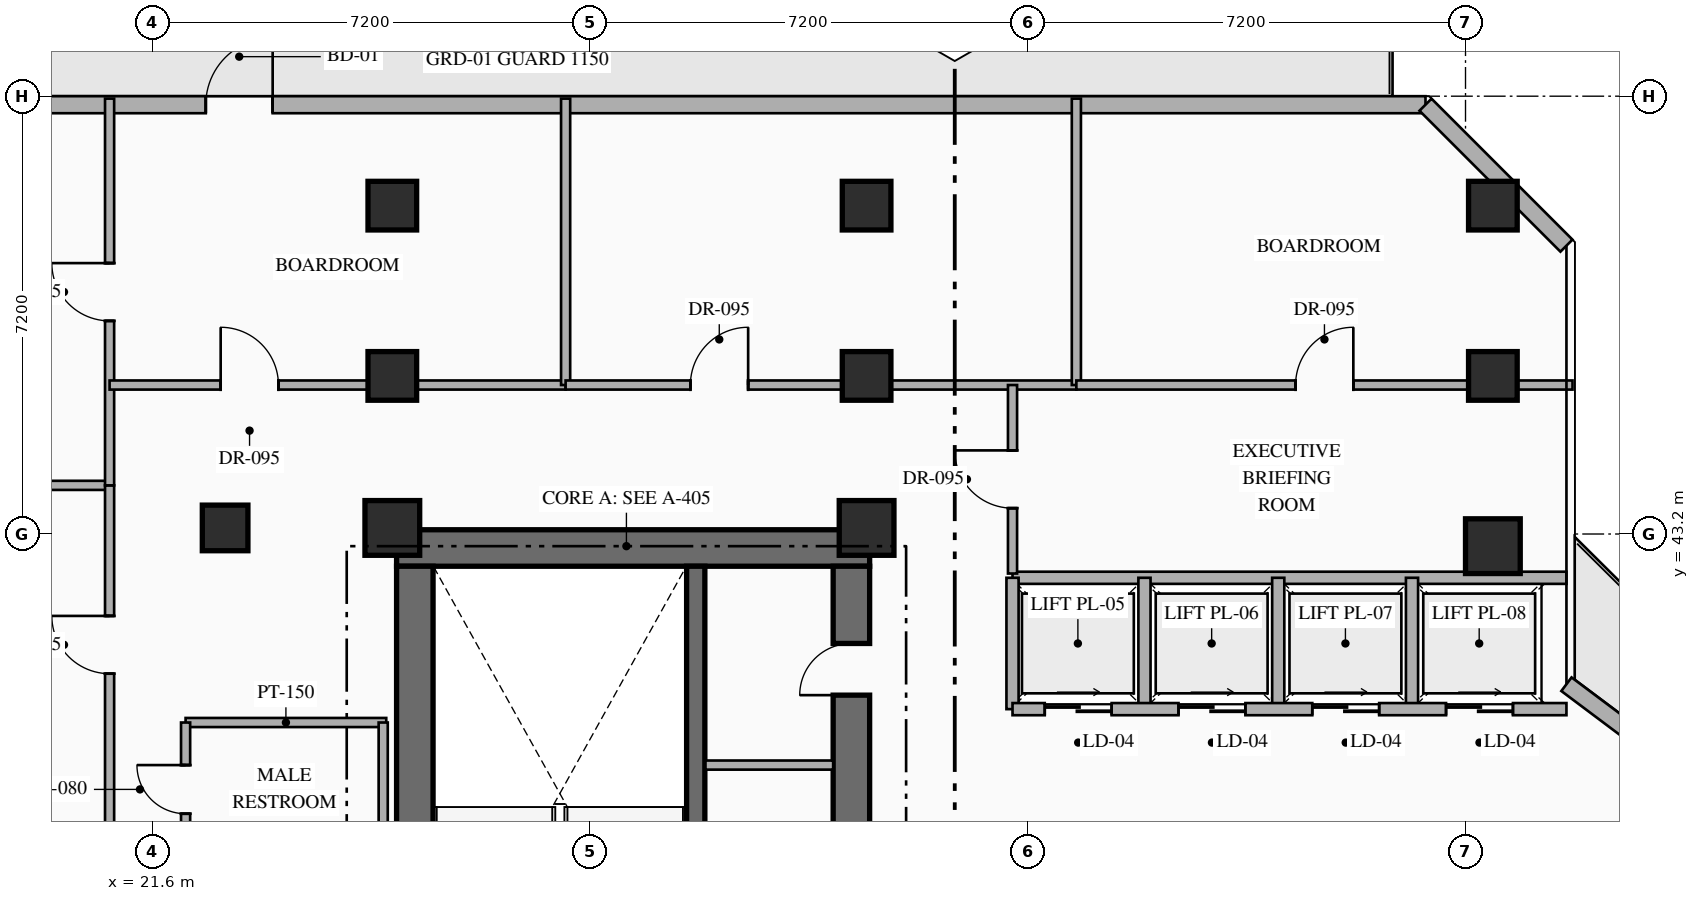
"""IFC4 building model, lengths in metres.
Left out: names, types, materials, properties, quantities, classifications, styles, units other than length and angle.
Written with IfcOpenShell. Run it as: python <this file> out.ifc"""

import sys

from ifc_helpers import new_model, si_unit, direction, frame, frame_2d, origin, origin_2d, place, context, subcontext, project, spatial, rectangle, hollow_rectangle, extrude, element, fill, save


model = new_model("IFC4")
c1 = context("Model", 3, precision=1e-05, world=origin(), true_north=direction((0.0, 1.0)))
c2 = subcontext(c1, "Body", "Model", "MODEL_VIEW")
j1 = project(units=[si_unit("LENGTHUNIT", "METRE"), si_unit("PLANEANGLEUNIT", "RADIAN")], contexts=[c1])
p1 = place(None, origin())
s1 = spatial("IfcSite", under=j1, at=p1, CompositionType="ELEMENT")
p2 = place(p1, origin())
s2 = spatial("IfcBuilding", under=s1, at=p2, CompositionType="ELEMENT")
p3 = place(p2, frame((0.0, 0.0, 178.05)))
s3 = spatial("IfcBuildingStorey", under=s2, at=p3, CompositionType="ELEMENT", Elevation=178.05)
p4 = place(p3, frame((25.62, 42.97, 0.0), z_axis=(0.0, 0.0, 1.0), x_axis=(1.0, 0.0, 0.0)))
e1 = element("IfcWall", 1, at=p4, inside=s3, PredefinedType="SHEAR", context=c2, shape_type="SweptSolid", body=[
    extrude(rectangle(XDim=7.78, YDim=0.6, at=frame_2d((3.89, 0.0))), origin(), (0.0, 0.0, 1.0), 3.6),
])
p5 = place(p3, frame((25.92, 33.19, 0.0), z_axis=(0.0, 0.0, 1.0), x_axis=(0.0, 1.0, 0.0)))
e2 = element("IfcWall", 2, at=p5, inside=s3, PredefinedType="SHEAR", context=c2, shape_type="SweptSolid", body=[
    extrude(rectangle(XDim=9.48, YDim=0.6, at=frame_2d((4.74, 0.0))), origin(), (0.0, 0.0, 1.0), 3.6),
])
p6 = place(p3, frame((33.1, 33.19, 0.0), z_axis=(0.0, 0.0, 1.0), x_axis=(0.0, 1.0, 0.0)))
e3 = element("IfcWall", 3, at=p6, inside=s3, PredefinedType="SHEAR", context=c2, shape_type="SweptSolid", body=[
    extrude(rectangle(XDim=9.48, YDim=0.6, at=frame_2d((4.74, 0.0))), origin(), (0.0, 0.0, 1.0), 3.6),
])
p7 = place(p6, frame((4.16, 0.0, 0.0)))
e4 = element("IfcOpeningElement", 4, at=p7, cuts=e3, PredefinedType="OPENING", context=c2, shape_type="SweptSolid", body=[
    extrude(rectangle(XDim=0.85, YDim=2.08, at=frame_2d((0.425, 1.04))), frame((0.0, 0.31, 0.0), z_axis=(0.0, -1.0, 0.0), x_axis=(1.0, 0.0, 0.0)), (0.0, 0.0, 1.0), 0.62),
])
p8 = place(p6, frame((7.36, 0.0, 0.0)))
e5 = element("IfcOpeningElement", 5, at=p8, cuts=e3, PredefinedType="OPENING", context=c2, shape_type="SweptSolid", body=[
    extrude(rectangle(XDim=0.85, YDim=2.08, at=frame_2d((0.425, 1.04))), frame((0.0, 0.31, 0.0), z_axis=(0.0, -1.0, 0.0), x_axis=(1.0, 0.0, 0.0)), (0.0, 0.0, 1.0), 0.62),
])
p9 = place(p3, frame((30.54, 33.19, 0.0), z_axis=(0.0, 0.0, 1.0), x_axis=(0.0, 1.0, 0.0)))
e6 = element("IfcWall", 6, at=p9, inside=s3, PredefinedType="SHEAR", context=c2, shape_type="SweptSolid", body=[
    extrude(rectangle(XDim=9.48, YDim=0.3, at=frame_2d((4.74, 0.0))), origin(), (0.0, 0.0, 1.0), 3.6),
])
for number, where, z_axis, x_axis in (
    (7, (25.55, 43.3, 0.0), (0.0, 0.0, 1.0), (1.0, 0.0, 0.0)),
    (8, (33.35, 43.3, 0.0), (0.0, 0.0, 1.0), (1.0, 0.0, 0.0)),
    (9, (43.65, 43.0, 0.0), (0.0, 0.0, 1.0), (1.0, 0.0, 0.0)),
):
    element("IfcColumn", number, at=place(p3, frame(where, z_axis=z_axis, x_axis=x_axis)), inside=s3, PredefinedType="COLUMN", context=c2, shape_type="SweptSolid", body=[
        extrude(rectangle(XDim=0.9, YDim=0.9, at=origin_2d()), origin(), (0.0, 0.0, 1.0), 3.6),
    ])
for number, where, z_axis, x_axis in (
    (10, (25.55, 45.8, 0.0), (0.0, 0.0, 1.0), (1.0, 0.0, 0.0)),
    (11, (33.35, 45.8, 0.0), (0.0, 0.0, 1.0), (1.0, 0.0, 0.0)),
    (12, (43.65, 45.8, 0.0), (0.0, 0.0, 1.0), (1.0, 0.0, 0.0)),
    (13, (25.55, 48.6, 0.0), (0.0, 0.0, 1.0), (1.0, 0.0, 0.0)),
    (14, (33.35, 48.6, 0.0), (0.0, 0.0, 1.0), (1.0, 0.0, 0.0)),
    (15, (43.65, 48.6, 0.0), (0.0, 0.0, 1.0), (1.0, 0.0, 0.0)),
):
    element("IfcColumn", number, at=place(p3, frame(where, z_axis=z_axis, x_axis=x_axis)), inside=s3, PredefinedType="COLUMN", context=c2, shape_type="SweptSolid", body=[
        extrude(hollow_rectangle(XDim=0.8, YDim=0.8, WallThickness=0.032, at=origin_2d()), origin(), (0.0, 0.0, 1.0), 3.6),
    ])
p10 = place(p3, frame((22.8, 43.3, 0.0), z_axis=(0.0, 0.0, 1.0), x_axis=(1.0, 0.0, 0.0)))
e16 = element("IfcColumn", 16, at=p10, inside=s3, PredefinedType="COLUMN", context=c2, shape_type="SweptSolid", body=[
    extrude(hollow_rectangle(XDim=0.75, YDim=0.75, WallThickness=0.028, at=origin_2d()), origin(), (0.0, 0.0, 1.0), 3.6),
])
p11 = place(p3, frame((44.86, 40.73, 0.0), z_axis=(0.0, 0.0, 1.0), x_axis=(0.800007624502, -0.599989833863, 0.0)))
e17 = element("IfcWall", 17, at=p11, inside=s3, PredefinedType="STANDARD", context=c2, shape_type="SweptSolid", body=[
    extrude(rectangle(XDim=19.212, YDim=0.28, at=frame_2d((9.606, 0.0))), origin(), (0.0, 0.0, 1.0), 3.3),
])
p12 = place(p11, frame((1.755, 0.0, 0.0)))
e18 = element("IfcOpeningElement", 18, at=p12, cuts=e17, PredefinedType="OPENING", context=c2, shape_type="SweptSolid", body=[
    extrude(rectangle(XDim=1.1, YDim=2.2, at=frame_2d((0.55, 1.1))), frame((0.0, 0.15, 0.0), z_axis=(0.0, -1.0, 0.0), x_axis=(1.0, 0.0, 0.0)), (0.0, 0.0, 1.0), 0.3),
])
p13 = place(p11, frame((13.509, 0.0, 0.85)))
e19 = element("IfcOpeningElement", 19, at=p13, cuts=e17, PredefinedType="OPENING", context=c2, shape_type="SweptSolid", body=[
    extrude(rectangle(XDim=1.8, YDim=2.1, at=frame_2d((0.9, 1.05))), frame((0.0, 0.15, 0.0), z_axis=(0.0, -1.0, 0.0), x_axis=(1.0, 0.0, 0.0)), (0.0, 0.0, 1.0), 0.3),
])
p14 = place(p3, frame((12.058, 50.26, 0.0), z_axis=(0.0, 0.0, 1.0), x_axis=(1.0, 0.0, 0.0)))
e20 = element("IfcWall", 20, at=p14, inside=s3, PredefinedType="STANDARD", context=c2, shape_type="SweptSolid", body=[
    extrude(rectangle(XDim=30.484, YDim=0.28, at=frame_2d((15.242, 0.0))), origin(), (0.0, 0.0, 1.0), 3.3),
])
p15 = place(p14, frame((10.424, 0.0, 0.0)))
e21 = element("IfcOpeningElement", 21, at=p15, cuts=e20, PredefinedType="OPENING", context=c2, shape_type="SweptSolid", body=[
    extrude(rectangle(XDim=1.1, YDim=2.2, at=frame_2d((0.55, 1.1))), frame((0.0, 0.15, 0.0), z_axis=(0.0, -1.0, 0.0), x_axis=(1.0, 0.0, 0.0)), (0.0, 0.0, 1.0), 0.3),
])
p16 = place(p3, frame((42.542, 50.26, 0.0), z_axis=(0.0, 0.0, 1.0), x_axis=(0.707106781187, -0.707106781187, 0.0)))
e22 = element("IfcWall", 22, at=p16, inside=s3, PredefinedType="STANDARD", context=c2, shape_type="SweptSolid", body=[
    extrude(rectangle(XDim=3.278, YDim=0.28, at=frame_2d((1.639, 0.0))), origin(), (0.0, 0.0, 1.0), 3.3),
])
p17 = place(p3, frame((30.7, 39.4, 0.0), z_axis=(0.0, 0.0, 1.0), x_axis=(1.0, 0.0, 0.0)))
e23 = element("IfcWall", 23, at=p17, inside=s3, PredefinedType="PARTITIONING", context=c2, shape_type="SweptSolid", body=[
    extrude(rectangle(XDim=2.1, YDim=0.15, at=frame_2d((1.05, 0.0))), origin(), (0.0, 0.0, 1.0), 3.3),
])
p18 = place(p3, frame((35.75, 42.48, 0.0), z_axis=(0.0, 0.0, 1.0), x_axis=(1.0, 0.0, 0.0)))
e24 = element("IfcWall", 24, at=p18, inside=s3, PredefinedType="STANDARD", context=c2, shape_type="SweptSolid", body=[
    extrude(rectangle(XDim=9.11, YDim=0.2, at=frame_2d((4.555, 0.0))), origin(), (0.0, 0.0, 1.0), 3.3),
])
for number, where, z_axis, x_axis in (
    (25, (35.75, 40.32, 0.0), (0.0, 0.0, 1.0), (0.0, 1.0, 0.0)),
    (26, (37.92, 40.32, 0.0), (0.0, 0.0, 1.0), (0.0, 1.0, 0.0)),
    (27, (40.12, 40.32, 0.0), (0.0, 0.0, 1.0), (0.0, 1.0, 0.0)),
    (28, (42.32, 40.32, 0.0), (0.0, 0.0, 1.0), (0.0, 1.0, 0.0)),
):
    element("IfcWall", number, at=place(p3, frame(where, z_axis=z_axis, x_axis=x_axis)), inside=s3, PredefinedType="STANDARD", context=c2, shape_type="SweptSolid", body=[
        extrude(rectangle(XDim=2.16, YDim=0.2, at=frame_2d((1.08, 0.0))), origin(), (0.0, 0.0, 1.0), 3.3),
    ])
p19 = place(p3, frame((35.75, 40.32, 0.0), z_axis=(0.0, 0.0, 1.0), x_axis=(1.0, 0.0, 0.0)))
e29 = element("IfcWall", 29, at=p19, inside=s3, PredefinedType="STANDARD", context=c2, shape_type="SweptSolid", body=[
    extrude(rectangle(XDim=9.11, YDim=0.2, at=frame_2d((4.555, 0.0))), origin(), (0.0, 0.0, 1.0), 3.3),
])
p20 = place(p19, frame((0.53, 0.0, 0.0)))
e30 = element("IfcOpeningElement", 30, at=p20, cuts=e29, PredefinedType="OPENING", context=c2, shape_type="SweptSolid", body=[
    extrude(rectangle(XDim=1.1, YDim=2.18, at=frame_2d((0.55, 1.09))), frame((0.0, 0.11, 0.0), z_axis=(0.0, -1.0, 0.0), x_axis=(1.0, 0.0, 0.0)), (0.0, 0.0, 1.0), 0.22),
])
p21 = place(p19, frame((2.73, 0.0, 0.0)))
e31 = element("IfcOpeningElement", 31, at=p21, cuts=e29, PredefinedType="OPENING", context=c2, shape_type="SweptSolid", body=[
    extrude(rectangle(XDim=1.1, YDim=2.18, at=frame_2d((0.55, 1.09))), frame((0.0, 0.11, 0.0), z_axis=(0.0, -1.0, 0.0), x_axis=(1.0, 0.0, 0.0)), (0.0, 0.0, 1.0), 0.22),
])
p22 = place(p19, frame((4.93, 0.0, 0.0)))
e32 = element("IfcOpeningElement", 32, at=p22, cuts=e29, PredefinedType="OPENING", context=c2, shape_type="SweptSolid", body=[
    extrude(rectangle(XDim=1.1, YDim=2.18, at=frame_2d((0.55, 1.09))), frame((0.0, 0.11, 0.0), z_axis=(0.0, -1.0, 0.0), x_axis=(1.0, 0.0, 0.0)), (0.0, 0.0, 1.0), 0.22),
])
p23 = place(p19, frame((7.13, 0.0, 0.0)))
e33 = element("IfcOpeningElement", 33, at=p23, cuts=e29, PredefinedType="OPENING", context=c2, shape_type="SweptSolid", body=[
    extrude(rectangle(XDim=1.1, YDim=2.18, at=frame_2d((0.55, 1.09))), frame((0.0, 0.11, 0.0), z_axis=(0.0, -1.0, 0.0), x_axis=(1.0, 0.0, 0.0)), (0.0, 0.0, 1.0), 0.22),
])
p24 = place(p3, frame((22.15, 40.1, 0.0), z_axis=(0.0, 0.0, 1.0), x_axis=(1.0, 0.0, 0.0)))
e34 = element("IfcWall", 34, at=p24, inside=s3, PredefinedType="PARTITIONING", context=c2, shape_type="SweptSolid", body=[
    extrude(rectangle(XDim=3.3, YDim=0.15, at=frame_2d((1.65, 0.0))), origin(), (0.0, 0.0, 1.0), 3.3),
])
p25 = place(p3, frame((25.4, 33.5, 0.0), z_axis=(0.0, 0.0, 1.0), x_axis=(0.0, 1.0, 0.0)))
e35 = element("IfcWall", 35, at=p25, inside=s3, PredefinedType="PARTITIONING", context=c2, shape_type="SweptSolid", body=[
    extrude(rectangle(XDim=6.6, YDim=0.15, at=frame_2d((3.3, 0.0))), origin(), (0.0, 0.0, 1.0), 3.3),
])
p26 = place(p3, frame((22.15, 37.9, 0.0), z_axis=(0.0, 0.0, 1.0), x_axis=(0.0, 1.0, 0.0)))
e36 = element("IfcWall", 36, at=p26, inside=s3, PredefinedType="PARTITIONING", context=c2, shape_type="SweptSolid", body=[
    extrude(rectangle(XDim=2.2, YDim=0.15, at=frame_2d((1.1, 0.0))), origin(), (0.0, 0.0, 1.0), 3.3),
])
p27 = place(p26, frame((0.7, 0.0, 0.0)))
e37 = element("IfcOpeningElement", 37, at=p27, cuts=e36, PredefinedType="OPENING", context=c2, shape_type="SweptSolid", body=[
    extrude(rectangle(XDim=0.8, YDim=2.06, at=frame_2d((0.4, 1.03))), frame((0.0, 0.085, 0.0), z_axis=(0.0, -1.0, 0.0), x_axis=(1.0, 0.0, 0.0)), (0.0, 0.0, 1.0), 0.17),
])
p28 = place(p3, frame((9.64, 44.0, 0.0), z_axis=(0.0, 0.0, 1.0), x_axis=(1.0, 0.0, 0.0)))
e38 = element("IfcWall", 38, at=p28, inside=s3, PredefinedType="PARTITIONING", context=c2, shape_type="SweptSolid", body=[
    extrude(rectangle(XDim=11.26, YDim=0.15, at=frame_2d((5.63, 0.0))), origin(), (0.0, 0.0, 1.0), 3.3),
])
p29 = place(p3, frame((20.9, 36.4, 0.0), z_axis=(0.0, 0.0, 1.0), x_axis=(0.0, 1.0, 0.0)))
e39 = element("IfcWall", 39, at=p29, inside=s3, PredefinedType="PARTITIONING", context=c2, shape_type="SweptSolid", body=[
    extrude(rectangle(XDim=7.6, YDim=0.15, at=frame_2d((3.8, 0.0))), origin(), (0.0, 0.0, 1.0), 3.3),
])
p30 = place(p29, frame((4.503, 0.0, 0.0)))
e40 = element("IfcOpeningElement", 40, at=p30, cuts=e39, PredefinedType="OPENING", context=c2, shape_type="SweptSolid", body=[
    extrude(rectangle(XDim=0.95, YDim=2.15, at=frame_2d((0.475, 1.075))), frame((0.0, 0.085, 0.0), z_axis=(0.0, -1.0, 0.0), x_axis=(1.0, 0.0, 0.0)), (0.0, 0.0, 1.0), 0.17),
])
p31 = place(p3, frame((20.9, 44.0, 0.0), z_axis=(0.0, 0.0, 1.0), x_axis=(0.0, 1.0, 0.0)))
e41 = element("IfcWall", 41, at=p31, inside=s3, PredefinedType="PARTITIONING", context=c2, shape_type="SweptSolid", body=[
    extrude(rectangle(XDim=6.36, YDim=0.15, at=frame_2d((3.18, 0.0))), origin(), (0.0, 0.0, 1.0), 3.3),
])
p32 = place(p31, frame((2.705, 0.0, 0.0)))
e42 = element("IfcOpeningElement", 42, at=p32, cuts=e41, PredefinedType="OPENING", context=c2, shape_type="SweptSolid", body=[
    extrude(rectangle(XDim=0.95, YDim=2.15, at=frame_2d((0.475, 1.075))), frame((0.0, 0.085, 0.0), z_axis=(0.0, -1.0, 0.0), x_axis=(1.0, 0.0, 0.0)), (0.0, 0.0, 1.0), 0.17),
])
p33 = place(p3, frame((20.9, 45.65, 0.0), z_axis=(0.0, 0.0, 1.0), x_axis=(1.0, 0.0, 0.0)))
e43 = element("IfcWall", 43, at=p33, inside=s3, PredefinedType="PARTITIONING", context=c2, shape_type="SweptSolid", body=[
    extrude(rectangle(XDim=7.5, YDim=0.15, at=frame_2d((3.75, 0.0))), origin(), (0.0, 0.0, 1.0), 2.645),
])
p34 = place(p33, frame((1.827, 0.0, 0.0)))
e44 = element("IfcOpeningElement", 44, at=p34, cuts=e43, PredefinedType="OPENING", context=c2, shape_type="SweptSolid", body=[
    extrude(rectangle(XDim=0.95, YDim=2.15, at=frame_2d((0.475, 1.075))), frame((0.0, 0.085, 0.0), z_axis=(0.0, -1.0, 0.0), x_axis=(1.0, 0.0, 0.0)), (0.0, 0.0, 1.0), 0.17),
])
p35 = place(p3, frame((28.4, 45.65, 0.0), z_axis=(0.0, 0.0, 1.0), x_axis=(0.0, 1.0, 0.0)))
e45 = element("IfcWall", 45, at=p35, inside=s3, PredefinedType="PARTITIONING", context=c2, shape_type="SweptSolid", body=[
    extrude(rectangle(XDim=4.71, YDim=0.15, at=frame_2d((2.355, 0.0))), origin(), (0.0, 0.0, 1.0), 3.3),
])
p36 = place(p3, frame((28.4, 45.65, 0.0), z_axis=(0.0, 0.0, 1.0), x_axis=(1.0, 0.0, 0.0)))
e46 = element("IfcWall", 46, at=p36, inside=s3, PredefinedType="PARTITIONING", context=c2, shape_type="SweptSolid", body=[
    extrude(rectangle(XDim=8.4, YDim=0.15, at=frame_2d((4.2, 0.0))), origin(), (0.0, 0.0, 1.0), 2.645),
])
p37 = place(p36, frame((2.052, 0.0, 0.0)))
e47 = element("IfcOpeningElement", 47, at=p37, cuts=e46, PredefinedType="OPENING", context=c2, shape_type="SweptSolid", body=[
    extrude(rectangle(XDim=0.95, YDim=2.15, at=frame_2d((0.475, 1.075))), frame((0.0, 0.085, 0.0), z_axis=(0.0, -1.0, 0.0), x_axis=(1.0, 0.0, 0.0)), (0.0, 0.0, 1.0), 0.17),
])
p38 = place(p3, frame((36.8, 45.65, 0.0), z_axis=(0.0, 0.0, 1.0), x_axis=(0.0, 1.0, 0.0)))
e48 = element("IfcWall", 48, at=p38, inside=s3, PredefinedType="PARTITIONING", context=c2, shape_type="SweptSolid", body=[
    extrude(rectangle(XDim=4.71, YDim=0.15, at=frame_2d((2.355, 0.0))), origin(), (0.0, 0.0, 1.0), 3.3),
])
p39 = place(p3, frame((36.8, 45.65, 0.0), z_axis=(0.0, 0.0, 1.0), x_axis=(1.0, 0.0, 0.0)))
e49 = element("IfcWall", 49, at=p39, inside=s3, PredefinedType="PARTITIONING", context=c2, shape_type="SweptSolid", body=[
    extrude(rectangle(XDim=8.16, YDim=0.15, at=frame_2d((4.08, 0.0))), origin(), (0.0, 0.0, 1.0), 2.645),
])
p40 = place(p39, frame((3.605, 0.0, 0.0)))
e50 = element("IfcOpeningElement", 50, at=p40, cuts=e49, PredefinedType="OPENING", context=c2, shape_type="SweptSolid", body=[
    extrude(rectangle(XDim=0.95, YDim=2.15, at=frame_2d((0.475, 1.075))), frame((0.0, 0.085, 0.0), z_axis=(0.0, -1.0, 0.0), x_axis=(1.0, 0.0, 0.0)), (0.0, 0.0, 1.0), 0.17),
])
p41 = place(p3, frame((35.75, 42.55, 0.0), z_axis=(0.0, 0.0, 1.0), x_axis=(0.0, 1.0, 0.0)))
e51 = element("IfcWall", 51, at=p41, inside=s3, PredefinedType="PARTITIONING", context=c2, shape_type="SweptSolid", body=[
    extrude(rectangle(XDim=3.1, YDim=0.15, at=frame_2d((1.55, 0.0))), origin(), (0.0, 0.0, 1.0), 3.3),
])
p42 = place(p41, frame((1.075, 0.0, 0.0)))
e52 = element("IfcOpeningElement", 52, at=p42, cuts=e51, PredefinedType="OPENING", context=c2, shape_type="SweptSolid", body=[
    extrude(rectangle(XDim=0.95, YDim=2.15, at=frame_2d((0.475, 1.075))), frame((0.0, 0.085, 0.0), z_axis=(0.0, -1.0, 0.0), x_axis=(1.0, 0.0, 0.0)), (0.0, 0.0, 1.0), 0.17),
])
p43 = place(p15, origin())
e53 = element("IfcDoor", 53, at=p43, inside=s3, OperationType="SINGLE_SWING_RIGHT", PredefinedType="DOOR", context=c2, shape_type="SweptSolid", body=[
    extrude(rectangle(XDim=1.1, YDim=2.2, at=frame_2d((0.55, 1.1))), frame((0.0, 0.025, 0.0), z_axis=(0.0, -1.0, 0.0), x_axis=(1.0, 0.0, 0.0)), (0.0, 0.0, 1.0), 0.05),
])
fill(e21, e53)
p44 = place(p8, origin())
e54 = element("IfcDoor", 54, at=p44, inside=s3, OperationType="SINGLE_SWING_LEFT", PredefinedType="DOOR", context=c2, shape_type="SweptSolid", body=[
    extrude(rectangle(XDim=0.85, YDim=2.08, at=frame_2d((0.425, 1.04))), frame((0.0, 0.025, 0.0), z_axis=(0.0, -1.0, 0.0), x_axis=(1.0, 0.0, 0.0)), (0.0, 0.0, 1.0), 0.05),
])
fill(e5, e54)
p45 = place(p20, origin())
e55 = element("IfcDoor", 55, at=p45, inside=s3, OperationType="SLIDING_TO_RIGHT", PredefinedType="USERDEFINED", context=c2, shape_type="SweptSolid", body=[
    extrude(rectangle(XDim=1.1, YDim=2.18, at=frame_2d((0.55, 1.09))), frame((0.0, 0.025, 0.0), z_axis=(0.0, -1.0, 0.0), x_axis=(1.0, 0.0, 0.0)), (0.0, 0.0, 1.0), 0.05),
])
fill(e30, e55)
p46 = place(p21, origin())
e56 = element("IfcDoor", 56, at=p46, inside=s3, OperationType="SLIDING_TO_RIGHT", PredefinedType="USERDEFINED", context=c2, shape_type="SweptSolid", body=[
    extrude(rectangle(XDim=1.1, YDim=2.18, at=frame_2d((0.55, 1.09))), frame((0.0, 0.025, 0.0), z_axis=(0.0, -1.0, 0.0), x_axis=(1.0, 0.0, 0.0)), (0.0, 0.0, 1.0), 0.05),
])
fill(e31, e56)
p47 = place(p22, origin())
e57 = element("IfcDoor", 57, at=p47, inside=s3, OperationType="SLIDING_TO_RIGHT", PredefinedType="USERDEFINED", context=c2, shape_type="SweptSolid", body=[
    extrude(rectangle(XDim=1.1, YDim=2.18, at=frame_2d((0.55, 1.09))), frame((0.0, 0.025, 0.0), z_axis=(0.0, -1.0, 0.0), x_axis=(1.0, 0.0, 0.0)), (0.0, 0.0, 1.0), 0.05),
])
fill(e32, e57)
p48 = place(p23, origin())
e58 = element("IfcDoor", 58, at=p48, inside=s3, OperationType="SLIDING_TO_RIGHT", PredefinedType="USERDEFINED", context=c2, shape_type="SweptSolid", body=[
    extrude(rectangle(XDim=1.1, YDim=2.18, at=frame_2d((0.55, 1.09))), frame((0.0, 0.025, 0.0), z_axis=(0.0, -1.0, 0.0), x_axis=(1.0, 0.0, 0.0)), (0.0, 0.0, 1.0), 0.05),
])
fill(e33, e58)
p49 = place(p27, origin())
e59 = element("IfcDoor", 59, at=p49, inside=s3, OperationType="SINGLE_SWING_RIGHT", PredefinedType="DOOR", context=c2, shape_type="SweptSolid", body=[
    extrude(rectangle(XDim=0.8, YDim=2.06, at=frame_2d((0.4, 1.03))), frame((0.0, 0.025, 0.0), z_axis=(0.0, -1.0, 0.0), x_axis=(1.0, 0.0, 0.0)), (0.0, 0.0, 1.0), 0.05),
])
fill(e37, e59)
p50 = place(p30, origin())
e60 = element("IfcDoor", 60, at=p50, inside=s3, OperationType="SINGLE_SWING_RIGHT", PredefinedType="DOOR", context=c2, shape_type="SweptSolid", body=[
    extrude(rectangle(XDim=0.95, YDim=2.15, at=frame_2d((0.475, 1.075))), frame((0.0, 0.025, 0.0), z_axis=(0.0, -1.0, 0.0), x_axis=(1.0, 0.0, 0.0)), (0.0, 0.0, 1.0), 0.05),
])
fill(e40, e60)
p51 = place(p32, origin())
e61 = element("IfcDoor", 61, at=p51, inside=s3, OperationType="SINGLE_SWING_RIGHT", PredefinedType="DOOR", context=c2, shape_type="SweptSolid", body=[
    extrude(rectangle(XDim=0.95, YDim=2.15, at=frame_2d((0.475, 1.075))), frame((0.0, 0.025, 0.0), z_axis=(0.0, -1.0, 0.0), x_axis=(1.0, 0.0, 0.0)), (0.0, 0.0, 1.0), 0.05),
])
fill(e42, e61)
p52 = place(p34, origin())
e62 = element("IfcDoor", 62, at=p52, inside=s3, OperationType="SINGLE_SWING_LEFT", PredefinedType="DOOR", context=c2, shape_type="SweptSolid", body=[
    extrude(rectangle(XDim=0.95, YDim=2.15, at=frame_2d((0.475, 1.075))), frame((0.0, 0.025, 0.0), z_axis=(0.0, -1.0, 0.0), x_axis=(1.0, 0.0, 0.0)), (0.0, 0.0, 1.0), 0.05),
])
fill(e44, e62)
p53 = place(p37, origin())
e63 = element("IfcDoor", 63, at=p53, inside=s3, OperationType="SINGLE_SWING_RIGHT", PredefinedType="DOOR", context=c2, shape_type="SweptSolid", body=[
    extrude(rectangle(XDim=0.95, YDim=2.15, at=frame_2d((0.475, 1.075))), frame((0.0, 0.025, 0.0), z_axis=(0.0, -1.0, 0.0), x_axis=(1.0, 0.0, 0.0)), (0.0, 0.0, 1.0), 0.05),
])
fill(e47, e63)
p54 = place(p40, origin())
e64 = element("IfcDoor", 64, at=p54, inside=s3, OperationType="SINGLE_SWING_RIGHT", PredefinedType="DOOR", context=c2, shape_type="SweptSolid", body=[
    extrude(rectangle(XDim=0.95, YDim=2.15, at=frame_2d((0.475, 1.075))), frame((0.0, 0.025, 0.0), z_axis=(0.0, -1.0, 0.0), x_axis=(1.0, 0.0, 0.0)), (0.0, 0.0, 1.0), 0.05),
])
fill(e50, e64)
p55 = place(p42, origin())
e65 = element("IfcDoor", 65, at=p55, inside=s3, OperationType="SINGLE_SWING_RIGHT", PredefinedType="DOOR", context=c2, shape_type="SweptSolid", body=[
    extrude(rectangle(XDim=0.95, YDim=2.15, at=frame_2d((0.475, 1.075))), frame((0.0, 0.025, 0.0), z_axis=(0.0, -1.0, 0.0), x_axis=(1.0, 0.0, 0.0)), (0.0, 0.0, 1.0), 0.05),
])
fill(e52, e65)
save(model, sys.argv[1])
